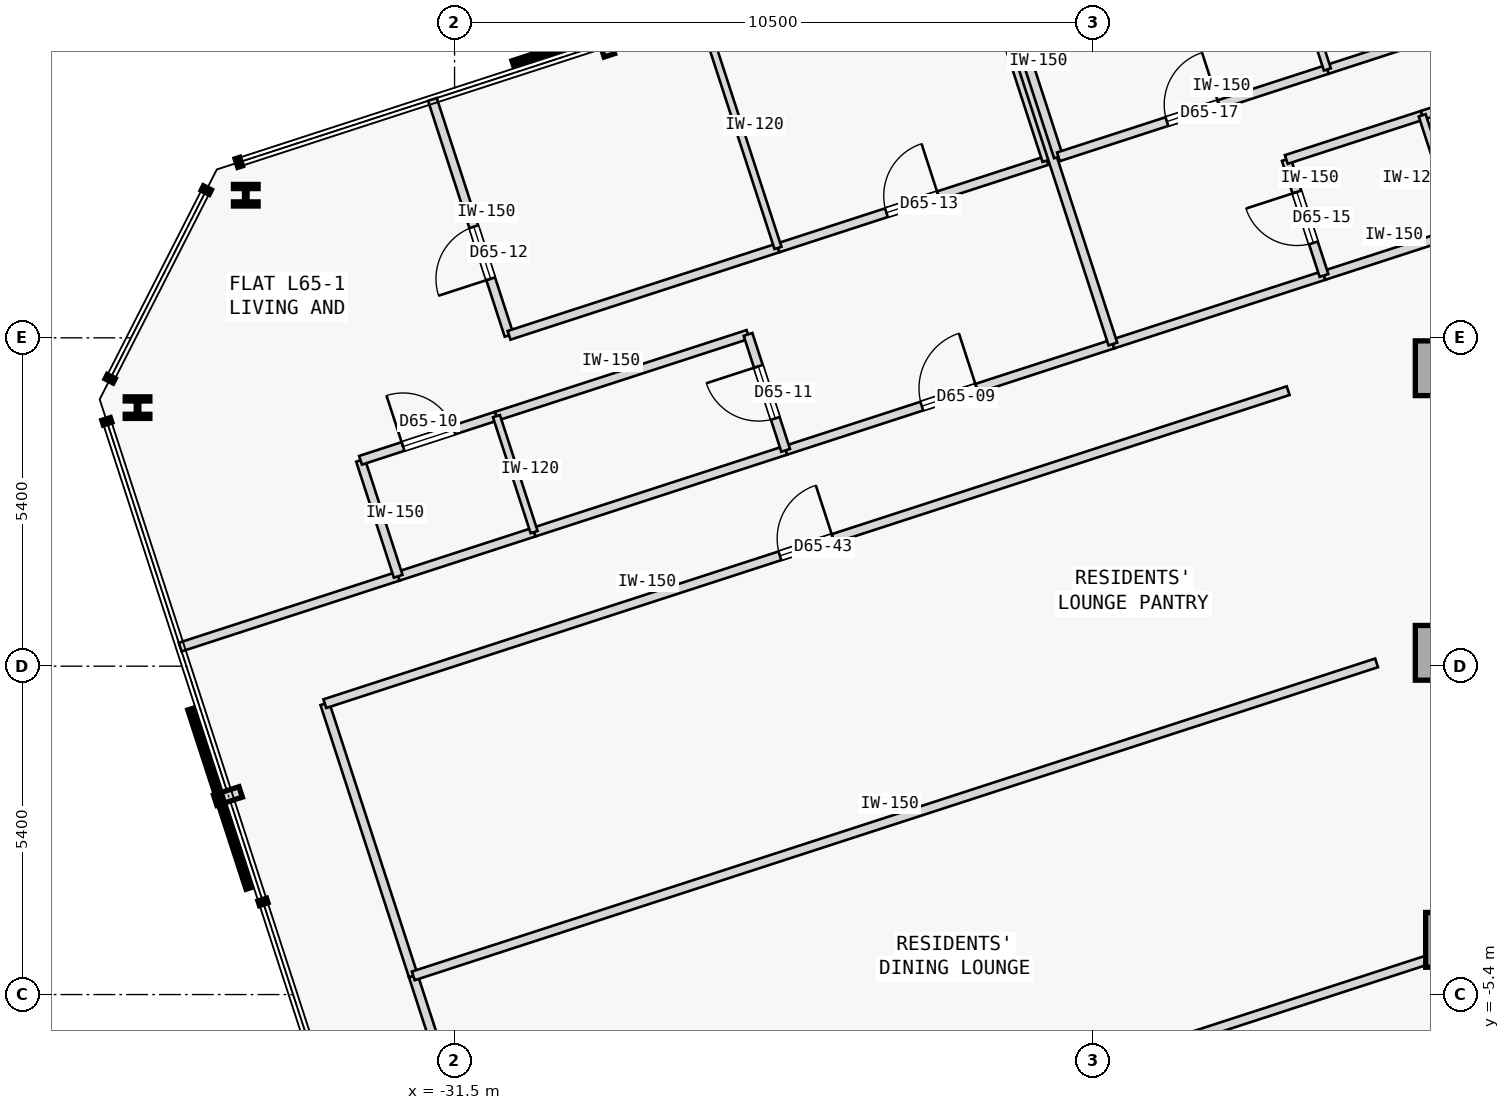
"""IFC4 building model, lengths in metres.
Left out: names, types, materials, properties, quantities, classifications, styles, units other than length and angle.
Written with IfcOpenShell. Run it as: python <this file> out.ifc"""

import sys

from ifc_helpers import new_model, si_unit, direction, frame, frame_2d, origin, origin_2d, place, context, subcontext, project, spatial, rectangle, i_section, extrude, element, fill, save


model = new_model("IFC4")
c1 = context("Model", 3, precision=1e-05, world=origin(), true_north=direction((0.0, 1.0)))
c2 = subcontext(c1, "Body", "Model", "MODEL_VIEW")
j1 = project(units=[si_unit("LENGTHUNIT", "METRE"), si_unit("PLANEANGLEUNIT", "RADIAN")], contexts=[c1])
p1 = place(None, origin())
s1 = spatial("IfcSite", under=j1, at=p1, CompositionType="ELEMENT")
p2 = place(p1, origin())
s2 = spatial("IfcBuilding", under=s1, at=p2, CompositionType="ELEMENT")
p3 = place(p2, frame((0.0, 0.0, 244.4)))
s3 = spatial("IfcBuildingStorey", under=s2, at=p3, CompositionType="ELEMENT", Elevation=244.4)
for number, where, z_axis, x_axis in (
    (1, (-15.25, 4.9, 0.0), (0.0, 0.0, 1.0), (1.0, 0.0, 0.0)),
    (2, (-15.25, 0.22, 0.0), (0.0, 0.0, 1.0), (1.0, 0.0, 0.0)),
    (3, (-15.08, -4.5, 0.0), (0.0, 0.0, 1.0), (1.0, 0.0, 0.0)),
):
    element("IfcColumn", number, at=place(p3, frame(where, z_axis=z_axis, x_axis=x_axis)), inside=s3, PredefinedType="COLUMN", context=c2, shape_type="SweptSolid", body=[
        extrude(rectangle(XDim=0.9, YDim=0.9, at=origin_2d()), origin(), (0.0, 0.0, 1.0), 3.35),
    ])
for number, where, z_axis, x_axis in (
    (4, (-34.934, 7.745, 0.0), (0.0, 0.0, 1.0), (1.0, 0.0, 0.0)),
    (5, (-36.713, 4.252, 0.0), (0.0, 0.0, 1.0), (1.0, 0.0, 0.0)),
):
    element("IfcColumn", number, at=place(p3, frame(where, z_axis=z_axis, x_axis=x_axis)), inside=s3, PredefinedType="COLUMN", context=c2, shape_type="SweptSolid", body=[
        extrude(i_section(OverallWidth=0.405, OverallDepth=0.355, WebThickness=0.042, FlangeThickness=0.068, FilletRadius=0.015, at=origin_2d()), origin(), (0.0, 0.0, 1.0), 3.35),
    ])
p4 = place(p3, frame((-36.012, 0.314, 0.0), z_axis=(0.0, 0.0, 1.0), x_axis=(0.951071182868, 0.308971851659, 0.0)))
e6 = element("IfcWall", 6, at=p4, inside=s3, PredefinedType="PARTITIONING", context=c2, shape_type="SweptSolid", body=[
    extrude(rectangle(XDim=3.77, YDim=0.15, at=frame_2d((1.885, 0.0))), origin(), (0.0, 0.0, 1.0), 3.125),
])
p5 = place(p3, frame((-26.055, 3.55, 0.0), z_axis=(0.0, 0.0, 1.0), x_axis=(0.951063554534, 0.308995332064, 0.0)))
e7 = element("IfcWall", 7, at=p5, inside=s3, PredefinedType="PARTITIONING", context=c2, shape_type="SweptSolid", body=[
    extrude(rectangle(XDim=5.658, YDim=0.15, at=frame_2d((2.829, 0.0))), origin(), (0.0, 0.0, 1.0), 3.125),
])
p6 = place(p5, frame((2.354, 0.0, 0.0)))
e8 = element("IfcOpeningElement", 8, at=p6, cuts=e7, PredefinedType="OPENING", context=c2, shape_type="SweptSolid", body=[
    extrude(rectangle(XDim=0.95, YDim=2.15, at=frame_2d((0.475, 1.075))), frame((0.0, 0.085, 0.0), z_axis=(0.0, -1.0, 0.0), x_axis=(1.0, 0.0, 0.0)), (0.0, 0.0, 1.0), 0.17),
])
p7 = place(p3, frame((-32.427, 1.479, 0.0), z_axis=(0.0, 0.0, 1.0), x_axis=(0.951045519245, 0.309050837767, 0.0)))
e9 = element("IfcWall", 9, at=p7, inside=s3, PredefinedType="PARTITIONING", context=c2, shape_type="SweptSolid", body=[
    extrude(rectangle(XDim=2.35, YDim=0.15, at=frame_2d((1.175, 0.0))), origin(), (0.0, 0.0, 1.0), 3.125),
])
p8 = place(p3, frame((-30.192, 2.205, 0.0), z_axis=(0.0, 0.0, 1.0), x_axis=(0.951052627573, 0.309028962374, 0.0)))
e10 = element("IfcWall", 10, at=p8, inside=s3, PredefinedType="PARTITIONING", context=c2, shape_type="SweptSolid", body=[
    extrude(rectangle(XDim=4.35, YDim=0.15, at=frame_2d((2.175, 0.0))), origin(), (0.0, 0.0, 1.0), 3.125),
])
p9 = place(p3, frame((-20.674, 5.298, 0.0), z_axis=(0.0, 0.0, 1.0), x_axis=(0.951057168147, 0.309014988174, 0.0)))
e11 = element("IfcWall", 11, at=p9, inside=s3, PredefinedType="PARTITIONING", context=c2, shape_type="SweptSolid", body=[
    extrude(rectangle(XDim=3.65, YDim=0.15, at=frame_2d((1.825, 0.0))), origin(), (0.0, 0.0, 1.0), 3.125),
])
p10 = place(p3, frame((-17.202, 6.426, 0.0), z_axis=(0.0, 0.0, 1.0), x_axis=(0.951035595692, 0.309081373955, 0.0)))
e12 = element("IfcWall", 12, at=p10, inside=s3, PredefinedType="PARTITIONING", context=c2, shape_type="SweptSolid", body=[
    extrude(rectangle(XDim=2.35, YDim=0.15, at=frame_2d((1.175, 0.0))), origin(), (0.0, 0.0, 1.0), 3.125),
])
p11 = place(p3, frame((-30.663, -9.757, 0.0), z_axis=(0.0, 0.0, 1.0), x_axis=(-0.309019653166, 0.951055652397, 0.0)))
e13 = element("IfcWall", 13, at=p11, inside=s3, PredefinedType="PARTITIONING", context=c2, shape_type="SweptSolid", body=[
    extrude(rectangle(XDim=4.904, YDim=0.15, at=frame_2d((2.452, 0.0))), origin(), (0.0, 0.0, 1.0), 3.125),
])
p12 = place(p11, frame((1.992, 0.0, 0.0)))
e14 = element("IfcOpeningElement", 14, at=p12, cuts=e13, PredefinedType="OPENING", context=c2, shape_type="SweptSolid", body=[
    extrude(rectangle(XDim=0.92, YDim=2.15, at=frame_2d((0.46, 1.075))), frame((0.0, 0.085, 0.0), z_axis=(0.0, -1.0, 0.0), x_axis=(1.0, 0.0, 0.0)), (0.0, 0.0, 1.0), 0.17),
])
p13 = place(p3, frame((-32.179, -5.093, 0.0), z_axis=(0.0, 0.0, 1.0), x_axis=(-0.309014532869, 0.951057316083, 0.0)))
e15 = element("IfcWall", 15, at=p13, inside=s3, PredefinedType="PARTITIONING", context=c2, shape_type="SweptSolid", body=[
    extrude(rectangle(XDim=4.707, YDim=0.15, at=frame_2d((2.354, 0.0))), origin(), (0.0, 0.0, 1.0), 3.125),
])
p14 = place(p3, frame((-33.633, -0.616, 0.0), z_axis=(0.0, 0.0, 1.0), x_axis=(0.951058192995, 0.309011833974, 0.0)))
e16 = element("IfcWall", 16, at=p14, inside=s3, PredefinedType="PARTITIONING", context=c2, shape_type="SweptSolid", body=[
    extrude(rectangle(XDim=16.657, YDim=0.15, at=frame_2d((8.329, 0.0))), origin(), (0.0, 0.0, 1.0), 3.125),
])
p15 = place(p14, frame((7.868, 0.0, 0.0)))
e17 = element("IfcOpeningElement", 17, at=p15, cuts=e16, PredefinedType="OPENING", context=c2, shape_type="SweptSolid", body=[
    extrude(rectangle(XDim=0.92, YDim=2.15, at=frame_2d((0.46, 1.075))), frame((0.0, 0.085, 0.0), z_axis=(0.0, -1.0, 0.0), x_axis=(1.0, 0.0, 0.0)), (0.0, 0.0, 1.0), 0.17),
])
p16 = place(p3, frame((-32.427, 1.479, 0.0), z_axis=(0.0, 0.0, 1.0), x_axis=(-0.309022749039, 0.951054646472, 0.0)))
e18 = element("IfcWall", 18, at=p16, inside=s3, PredefinedType="PARTITIONING", context=c2, shape_type="SweptSolid", body=[
    extrude(rectangle(XDim=2.005, YDim=0.15, at=frame_2d((1.002, 0.0))), origin(), (0.0, 0.0, 1.0), 3.125),
])
p17 = place(p3, frame((-33.046, 3.386, 0.0), z_axis=(0.0, 0.0, 1.0), x_axis=(0.951045519245, 0.309050837767, 0.0)))
e19 = element("IfcWall", 19, at=p17, inside=s3, PredefinedType="PARTITIONING", context=c2, shape_type="SweptSolid", body=[
    extrude(rectangle(XDim=2.35, YDim=0.15, at=frame_2d((1.175, 0.0))), origin(), (0.0, 0.0, 1.0), 3.125),
])
p18 = place(p17, frame((0.735, 0.0, 0.0)))
e20 = element("IfcOpeningElement", 20, at=p18, cuts=e19, PredefinedType="OPENING", context=c2, shape_type="SweptSolid", body=[
    extrude(rectangle(XDim=0.88, YDim=2.15, at=frame_2d((0.44, 1.075))), frame((0.0, 0.085, 0.0), z_axis=(0.0, -1.0, 0.0), x_axis=(1.0, 0.0, 0.0)), (0.0, 0.0, 1.0), 0.17),
])
p19 = place(p3, frame((-30.811, 4.112, 0.0), z_axis=(0.0, 0.0, 1.0), x_axis=(0.951069122051, 0.308978195154, 0.0)))
e21 = element("IfcWall", 21, at=p19, inside=s3, PredefinedType="PARTITIONING", context=c2, shape_type="SweptSolid", body=[
    extrude(rectangle(XDim=4.35, YDim=0.15, at=frame_2d((2.175, 0.0))), origin(), (0.0, 0.0, 1.0), 3.125),
])
p20 = place(p3, frame((-26.055, 3.55, 0.0), z_axis=(0.0, 0.0, 1.0), x_axis=(-0.309058537449, 0.951043017129, 0.0)))
e22 = element("IfcWall", 22, at=p20, inside=s3, PredefinedType="PARTITIONING", context=c2, shape_type="SweptSolid", body=[
    extrude(rectangle(XDim=2.005, YDim=0.15, at=frame_2d((1.002, 0.0))), origin(), (0.0, 0.0, 1.0), 3.125),
])
p21 = place(p20, frame((0.552, 0.0, 0.0)))
e23 = element("IfcOpeningElement", 23, at=p21, cuts=e22, PredefinedType="OPENING", context=c2, shape_type="SweptSolid", body=[
    extrude(rectangle(XDim=0.9, YDim=2.15, at=frame_2d((0.45, 1.075))), frame((0.0, 0.085, 0.0), z_axis=(0.0, -1.0, 0.0), x_axis=(1.0, 0.0, 0.0)), (0.0, 0.0, 1.0), 0.17),
])
p22 = place(p3, frame((-30.604, 5.441, 0.0), z_axis=(0.0, 0.0, 1.0), x_axis=(-0.309018403393, 0.951056058476, 0.0)))
e24 = element("IfcWall", 24, at=p22, inside=s3, PredefinedType="PARTITIONING", context=c2, shape_type="SweptSolid", body=[
    extrude(rectangle(XDim=4.079, YDim=0.15, at=frame_2d((2.04, 0.0))), origin(), (0.0, 0.0, 1.0), 3.125),
])
p23 = place(p22, frame((0.978, 0.0, 0.0)))
e25 = element("IfcOpeningElement", 25, at=p23, cuts=e24, PredefinedType="OPENING", context=c2, shape_type="SweptSolid", body=[
    extrude(rectangle(XDim=0.9, YDim=2.15, at=frame_2d((0.45, 1.075))), frame((0.0, 0.085, 0.0), z_axis=(0.0, -1.0, 0.0), x_axis=(1.0, 0.0, 0.0)), (0.0, 0.0, 1.0), 0.17),
])
p24 = place(p3, frame((-30.604, 5.441, 0.0), z_axis=(0.0, 0.0, 1.0), x_axis=(0.951070715387, 0.308973290646, 0.0)))
e26 = element("IfcWall", 26, at=p24, inside=s3, PredefinedType="PARTITIONING", context=c2, shape_type="SweptSolid", body=[
    extrude(rectangle(XDim=4.65, YDim=0.15, at=frame_2d((2.325, 0.0))), origin(), (0.0, 0.0, 1.0), 3.125),
])
p25 = place(p3, frame((-26.181, 6.878, 0.0), z_axis=(0.0, 0.0, 1.0), x_axis=(0.951050272606, 0.309036209813, 0.0)))
e27 = element("IfcWall", 27, at=p25, inside=s3, PredefinedType="PARTITIONING", context=c2, shape_type="SweptSolid", body=[
    extrude(rectangle(XDim=4.65, YDim=0.15, at=frame_2d((2.325, 0.0))), origin(), (0.0, 0.0, 1.0), 3.125),
])
p26 = place(p25, frame((1.875, 0.0, 0.0)))
e28 = element("IfcOpeningElement", 28, at=p26, cuts=e27, PredefinedType="OPENING", context=c2, shape_type="SweptSolid", body=[
    extrude(rectangle(XDim=0.9, YDim=2.15, at=frame_2d((0.45, 1.075))), frame((0.0, 0.085, 0.0), z_axis=(0.0, -1.0, 0.0), x_axis=(1.0, 0.0, 0.0)), (0.0, 0.0, 1.0), 0.17),
])
p27 = place(p3, frame((-21.759, 8.315, 0.0), z_axis=(0.0, 0.0, 1.0), x_axis=(-0.309018403393, 0.951056058476, 0.0)))
e29 = element("IfcWall", 29, at=p27, inside=s3, PredefinedType="PARTITIONING", context=c2, shape_type="SweptSolid", body=[
    extrude(rectangle(XDim=4.079, YDim=0.15, at=frame_2d((2.04, 0.0))), origin(), (0.0, 0.0, 1.0), 3.125),
])
p28 = place(p3, frame((-20.674, 5.298, 0.0), z_axis=(0.0, 0.0, 1.0), x_axis=(-0.309029230739, 0.951052540372, 0.0)))
e30 = element("IfcWall", 30, at=p28, inside=s3, PredefinedType="PARTITIONING", context=c2, shape_type="SweptSolid", body=[
    extrude(rectangle(XDim=7.284, YDim=0.15, at=frame_2d((3.642, 0.0))), origin(), (0.0, 0.0, 1.0), 3.125),
])
p29 = place(p3, frame((-30.192, 2.205, 0.0), z_axis=(0.0, 0.0, 1.0), x_axis=(-0.309022749039, 0.951054646472, 0.0)))
e31 = element("IfcWall", 31, at=p29, inside=s3, PredefinedType="PARTITIONING", context=c2, shape_type="SweptSolid", body=[
    extrude(rectangle(XDim=2.005, YDim=0.12, at=frame_2d((1.002, 0.0))), origin(), (0.0, 0.0, 1.0), 3.125),
])
p30 = place(p3, frame((-26.181, 6.878, 0.0), z_axis=(0.0, 0.0, 1.0), x_axis=(-0.309018403393, 0.951056058476, 0.0)))
e32 = element("IfcWall", 32, at=p30, inside=s3, PredefinedType="PARTITIONING", context=c2, shape_type="SweptSolid", body=[
    extrude(rectangle(XDim=4.079, YDim=0.12, at=frame_2d((2.04, 0.0))), origin(), (0.0, 0.0, 1.0), 3.125),
])
p31 = place(p3, frame((-17.202, 6.426, 0.0), z_axis=(0.0, 0.0, 1.0), x_axis=(-0.309022749039, 0.951054646472, 0.0)))
e33 = element("IfcWall", 33, at=p31, inside=s3, PredefinedType="PARTITIONING", context=c2, shape_type="SweptSolid", body=[
    extrude(rectangle(XDim=2.005, YDim=0.15, at=frame_2d((1.002, 0.0))), origin(), (0.0, 0.0, 1.0), 3.125),
])
p32 = place(p31, frame((0.562, 0.0, 0.0)))
e34 = element("IfcOpeningElement", 34, at=p32, cuts=e33, PredefinedType="OPENING", context=c2, shape_type="SweptSolid", body=[
    extrude(rectangle(XDim=0.88, YDim=2.15, at=frame_2d((0.44, 1.075))), frame((0.0, 0.085, 0.0), z_axis=(0.0, -1.0, 0.0), x_axis=(1.0, 0.0, 0.0)), (0.0, 0.0, 1.0), 0.17),
])
p33 = place(p3, frame((-17.822, 8.333, 0.0), z_axis=(0.0, 0.0, 1.0), x_axis=(0.951066131077, 0.308987401554, 0.0)))
e35 = element("IfcWall", 35, at=p33, inside=s3, PredefinedType="PARTITIONING", context=c2, shape_type="SweptSolid", body=[
    extrude(rectangle(XDim=2.35, YDim=0.15, at=frame_2d((1.175, 0.0))), origin(), (0.0, 0.0, 1.0), 3.125),
])
p34 = place(p3, frame((-15.587, 9.059, 0.0), z_axis=(0.0, 0.0, 1.0), x_axis=(0.951057987102, 0.309012467661, 0.0)))
e36 = element("IfcWall", 36, at=p34, inside=s3, PredefinedType="PARTITIONING", context=c2, shape_type="SweptSolid", body=[
    extrude(rectangle(XDim=4.35, YDim=0.15, at=frame_2d((2.175, 0.0))), origin(), (0.0, 0.0, 1.0), 3.125),
])
p35 = place(p3, frame((-21.569, 8.377, 0.0), z_axis=(0.0, 0.0, 1.0), x_axis=(-0.309018403393, 0.951056058476, 0.0)))
e37 = element("IfcWall", 37, at=p35, inside=s3, PredefinedType="PARTITIONING", context=c2, shape_type="SweptSolid", body=[
    extrude(rectangle(XDim=4.079, YDim=0.15, at=frame_2d((2.04, 0.0))), origin(), (0.0, 0.0, 1.0), 3.125),
])
p36 = place(p3, frame((-21.569, 8.377, 0.0), z_axis=(0.0, 0.0, 1.0), x_axis=(0.951050272606, 0.309036209813, 0.0)))
e38 = element("IfcWall", 38, at=p36, inside=s3, PredefinedType="PARTITIONING", context=c2, shape_type="SweptSolid", body=[
    extrude(rectangle(XDim=4.65, YDim=0.15, at=frame_2d((2.325, 0.0))), origin(), (0.0, 0.0, 1.0), 3.125),
])
p37 = place(p36, frame((1.875, 0.0, 0.0)))
e39 = element("IfcOpeningElement", 39, at=p37, cuts=e38, PredefinedType="OPENING", context=c2, shape_type="SweptSolid", body=[
    extrude(rectangle(XDim=0.9, YDim=2.15, at=frame_2d((0.45, 1.075))), frame((0.0, 0.085, 0.0), z_axis=(0.0, -1.0, 0.0), x_axis=(1.0, 0.0, 0.0)), (0.0, 0.0, 1.0), 0.17),
])
p38 = place(p3, frame((-17.146, 9.814, 0.0), z_axis=(0.0, 0.0, 1.0), x_axis=(0.951065702951, 0.308988719326, 0.0)))
e40 = element("IfcWall", 40, at=p38, inside=s3, PredefinedType="PARTITIONING", context=c2, shape_type="SweptSolid", body=[
    extrude(rectangle(XDim=4.65, YDim=0.15, at=frame_2d((2.325, 0.0))), origin(), (0.0, 0.0, 1.0), 3.125),
])
p39 = place(p3, frame((-14.967, 7.152, 0.0), z_axis=(0.0, 0.0, 1.0), x_axis=(-0.309058537449, 0.951043017129, 0.0)))
e41 = element("IfcWall", 41, at=p39, inside=s3, PredefinedType="PARTITIONING", context=c2, shape_type="SweptSolid", body=[
    extrude(rectangle(XDim=2.005, YDim=0.12, at=frame_2d((1.002, 0.0))), origin(), (0.0, 0.0, 1.0), 2.675),
])
p40 = place(p3, frame((-17.146, 9.814, 0.0), z_axis=(0.0, 0.0, 1.0), x_axis=(-0.309018403393, 0.951056058476, 0.0)))
e42 = element("IfcWall", 42, at=p40, inside=s3, PredefinedType="PARTITIONING", context=c2, shape_type="SweptSolid", body=[
    extrude(rectangle(XDim=4.079, YDim=0.12, at=frame_2d((2.04, 0.0))), origin(), (0.0, 0.0, 1.0), 3.125),
])
for number, where, z_axis, x_axis in (
    (43, (-30.663, -9.757, 0.0), (0.0, 0.0, 1.0), (0.951, 0.309, 0.0)),
    (44, (-32.179, -5.093, 0.0), (0.0, 0.0, 1.0), (0.951, 0.309, 0.0)),
):
    element("IfcWall", number, at=place(p3, frame(where, z_axis=z_axis, x_axis=x_axis)), inside=s3, PredefinedType="PARTITIONING", context=c2, shape_type="SweptSolid", body=[
        extrude(rectangle(XDim=16.657, YDim=0.15, at=frame_2d((8.329, 0.0))), origin(), (0.0, 0.0, 1.0), 3.125),
    ])
p41 = place(p6, origin())
e45 = element("IfcDoor", 45, at=p41, inside=s3, OperationType="SINGLE_SWING_RIGHT", PredefinedType="DOOR", context=c2, shape_type="SweptSolid", body=[
    extrude(rectangle(XDim=0.95, YDim=2.15, at=frame_2d((0.475, 1.075))), frame((0.0, 0.025, 0.0), z_axis=(0.0, -1.0, 0.0), x_axis=(1.0, 0.0, 0.0)), (0.0, 0.0, 1.0), 0.05),
])
fill(e8, e45)
p42 = place(p18, origin())
e46 = element("IfcDoor", 46, at=p42, inside=s3, OperationType="SINGLE_SWING_LEFT", PredefinedType="DOOR", context=c2, shape_type="SweptSolid", body=[
    extrude(rectangle(XDim=0.88, YDim=2.15, at=frame_2d((0.44, 1.075))), frame((0.0, 0.025, 0.0), z_axis=(0.0, -1.0, 0.0), x_axis=(1.0, 0.0, 0.0)), (0.0, 0.0, 1.0), 0.05),
])
fill(e20, e46)
p43 = place(p21, origin())
e47 = element("IfcDoor", 47, at=p43, inside=s3, OperationType="SINGLE_SWING_RIGHT", PredefinedType="DOOR", context=c2, shape_type="SweptSolid", body=[
    extrude(rectangle(XDim=0.9, YDim=2.15, at=frame_2d((0.45, 1.075))), frame((0.0, 0.025, 0.0), z_axis=(0.0, -1.0, 0.0), x_axis=(1.0, 0.0, 0.0)), (0.0, 0.0, 1.0), 0.05),
])
fill(e23, e47)
p44 = place(p23, origin())
e48 = element("IfcDoor", 48, at=p44, inside=s3, OperationType="SINGLE_SWING_LEFT", PredefinedType="DOOR", context=c2, shape_type="SweptSolid", body=[
    extrude(rectangle(XDim=0.9, YDim=2.15, at=frame_2d((0.45, 1.075))), frame((0.0, 0.025, 0.0), z_axis=(0.0, -1.0, 0.0), x_axis=(1.0, 0.0, 0.0)), (0.0, 0.0, 1.0), 0.05),
])
fill(e25, e48)
p45 = place(p26, origin())
e49 = element("IfcDoor", 49, at=p45, inside=s3, OperationType="SINGLE_SWING_RIGHT", PredefinedType="DOOR", context=c2, shape_type="SweptSolid", body=[
    extrude(rectangle(XDim=0.9, YDim=2.15, at=frame_2d((0.45, 1.075))), frame((0.0, 0.025, 0.0), z_axis=(0.0, -1.0, 0.0), x_axis=(1.0, 0.0, 0.0)), (0.0, 0.0, 1.0), 0.05),
])
fill(e28, e49)
p46 = place(p32, origin())
e50 = element("IfcDoor", 50, at=p46, inside=s3, OperationType="SINGLE_SWING_RIGHT", PredefinedType="DOOR", context=c2, shape_type="SweptSolid", body=[
    extrude(rectangle(XDim=0.88, YDim=2.15, at=frame_2d((0.44, 1.075))), frame((0.0, 0.025, 0.0), z_axis=(0.0, -1.0, 0.0), x_axis=(1.0, 0.0, 0.0)), (0.0, 0.0, 1.0), 0.05),
])
fill(e34, e50)
p47 = place(p37, origin())
e51 = element("IfcDoor", 51, at=p47, inside=s3, OperationType="SINGLE_SWING_RIGHT", PredefinedType="DOOR", context=c2, shape_type="SweptSolid", body=[
    extrude(rectangle(XDim=0.9, YDim=2.15, at=frame_2d((0.45, 1.075))), frame((0.0, 0.025, 0.0), z_axis=(0.0, -1.0, 0.0), x_axis=(1.0, 0.0, 0.0)), (0.0, 0.0, 1.0), 0.05),
])
fill(e39, e51)
p48 = place(p15, origin())
e52 = element("IfcDoor", 52, at=p48, inside=s3, OperationType="SINGLE_SWING_RIGHT", PredefinedType="DOOR", context=c2, shape_type="SweptSolid", body=[
    extrude(rectangle(XDim=0.92, YDim=2.15, at=frame_2d((0.46, 1.075))), frame((0.0, 0.025, 0.0), z_axis=(0.0, -1.0, 0.0), x_axis=(1.0, 0.0, 0.0)), (0.0, 0.0, 1.0), 0.05),
])
fill(e17, e52)
save(model, sys.argv[1])
